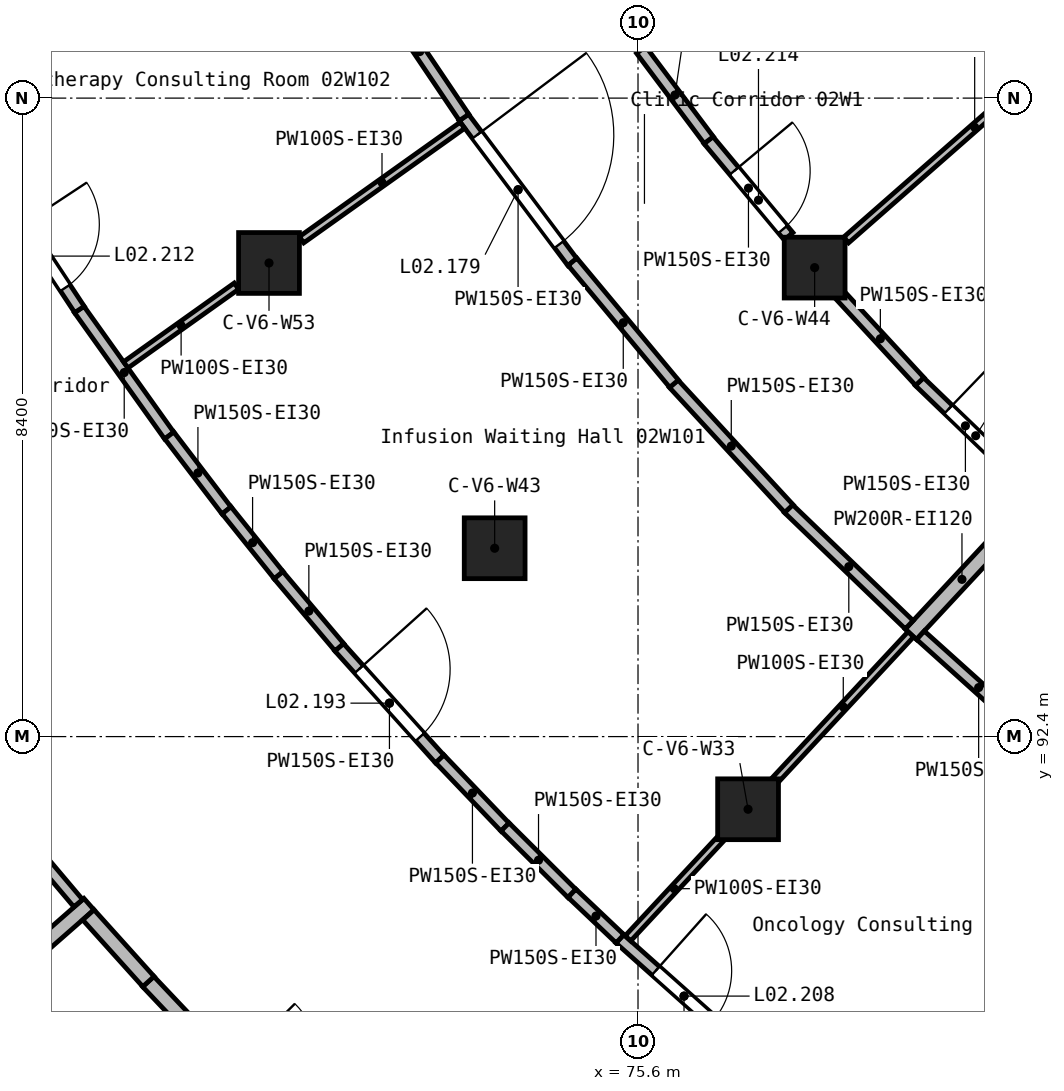
"""IFC4 building model, lengths in metres.
Left out: names, types, materials, properties, quantities, classifications, styles, units other than length and angle.
Written with IfcOpenShell. Run it as: python <this file> out.ifc"""

import sys

from ifc_helpers import new_model, si_unit, direction, frame, frame_2d, origin, origin_2d, place, context, subcontext, project, spatial, rectangle, extrude, element, fill, save


model = new_model("IFC4")
c1 = context("Model", 3, precision=1e-05, world=origin(), true_north=direction((0.0, 1.0)))
c2 = subcontext(c1, "Body", "Model", "MODEL_VIEW")
j1 = project(units=[si_unit("LENGTHUNIT", "METRE"), si_unit("PLANEANGLEUNIT", "RADIAN")], contexts=[c1])
p1 = place(None, origin())
s1 = spatial("IfcSite", under=j1, at=p1, CompositionType="ELEMENT")
p2 = place(p1, origin())
s2 = spatial("IfcBuilding", under=s1, at=p2, CompositionType="ELEMENT")
p3 = place(p2, frame((0.0, 0.0, 12.6)))
s3 = spatial("IfcBuildingStorey", under=s2, at=p3, CompositionType="ELEMENT", Elevation=12.6)
for number, where, z_axis, x_axis in (
    (1, (70.745, 98.631, 0.0), (0.0, 0.0, 1.0), (1.0, 0.0, 0.0)),
    (2, (73.714, 94.878, 0.0), (0.0, 0.0, 1.0), (1.0, 0.0, 0.0)),
    (3, (77.048, 91.444, 0.0), (0.0, 0.0, 1.0), (1.0, 0.0, 0.0)),
    (4, (77.924, 98.57, 0.0), (0.0, 0.0, 1.0), (1.0, 0.0, 0.0)),
):
    element("IfcColumn", number, at=place(p3, frame(where, z_axis=z_axis, x_axis=x_axis)), inside=s3, PredefinedType="COLUMN", context=c2, shape_type="SweptSolid", body=[
        extrude(rectangle(XDim=0.8, YDim=0.8, at=origin_2d()), origin(), (0.0, 0.0, 1.0), 4.2),
    ])
p4 = place(p3, frame((66.869, 88.874, 0.0), z_axis=(0.0, 0.0, 1.0), x_axis=(0.751874567132, 0.659306177205, 0.0)))
e5 = element("IfcWall", 5, at=p4, inside=s3, PredefinedType="SOLIDWALL", context=c2, shape_type="SweptSolid", body=[
    extrude(rectangle(XDim=2.004, YDim=0.2, at=frame_2d((1.002, 0.0))), origin(), (0.0, 0.0, 1.0), 3.85),
])
p5 = place(p3, frame((79.19, 93.746, 0.0), z_axis=(0.0, 0.0, 1.0), x_axis=(0.681171780306, 0.732123627344, 0.0)))
e6 = element("IfcWall", 6, at=p5, inside=s3, PredefinedType="SOLIDWALL", context=c2, shape_type="SweptSolid", body=[
    extrude(rectangle(XDim=1.974, YDim=0.2, at=frame_2d((0.987, 0.0))), origin(), (0.0, 0.0, 1.0), 3.85),
])
p6 = place(p3, frame((69.155, 89.177, 0.0), z_axis=(0.0, 0.0, 1.0), x_axis=(0.687313254989, -0.726361128858, 0.0)))
e7 = element("IfcWall", 7, at=p6, inside=s3, PredefinedType="SOLIDWALL", context=c2, shape_type="SweptSolid", body=[
    extrude(rectangle(XDim=1.382, YDim=0.2, at=frame_2d((0.691, 0.0))), origin(), (0.0, 0.0, 1.0), 3.85),
])
p7 = place(p3, frame((68.369, 90.055, 0.0), z_axis=(0.0, 0.0, 1.0), x_axis=(0.669113274241, -0.74316043102, 0.0)))
e8 = element("IfcWall", 8, at=p7, inside=s3, PredefinedType="SOLIDWALL", context=c2, shape_type="SweptSolid", body=[
    extrude(rectangle(XDim=1.18, YDim=0.2, at=frame_2d((0.59, 0.0))), origin(), (0.0, 0.0, 1.0), 3.85),
])
p8 = place(p3, frame((73.307, 100.547, 0.0), z_axis=(0.0, 0.0, 1.0), x_axis=(0.600377090661, -0.799717043091, 0.0)))
e9 = element("IfcWall", 9, at=p8, inside=s3, PredefinedType="PARTITIONING", context=c2, shape_type="SweptSolid", body=[
    extrude(rectangle(XDim=2.382, YDim=0.15, at=frame_2d((1.191, 0.0))), origin(), (0.0, 0.0, 1.0), 3.85),
])
p9 = place(p8, frame((0.291, 0.0, 0.0)))
e10 = element("IfcOpeningElement", 10, at=p9, cuts=e9, PredefinedType="OPENING", context=c2, shape_type="SweptSolid", body=[
    extrude(rectangle(XDim=1.8, YDim=2.1, at=frame_2d((0.9, 1.05))), frame((0.0, 0.085, 0.0), z_axis=(0.0, -1.0, 0.0), x_axis=(1.0, 0.0, 0.0)), (0.0, 0.0, 1.0), 0.17),
])
p10 = place(p3, frame((77.579, 95.4, 0.0), z_axis=(0.0, 0.0, 1.0), x_axis=(0.720594722174, -0.693356507415, 0.0)))
e11 = element("IfcWall", 11, at=p10, inside=s3, PredefinedType="PARTITIONING", context=c2, shape_type="SweptSolid", body=[
    extrude(rectangle(XDim=2.205, YDim=0.15, at=frame_2d((1.103, 0.0))), origin(), (0.0, 0.0, 1.0), 3.85),
])
p11 = place(p3, frame((76.069, 97.043, 0.0), z_axis=(0.0, 0.0, 1.0), x_axis=(0.678030610295, -0.735033666918, 0.0)))
e12 = element("IfcWall", 12, at=p11, inside=s3, PredefinedType="PARTITIONING", context=c2, shape_type="SweptSolid", body=[
    extrude(rectangle(XDim=2.236, YDim=0.15, at=frame_2d((1.118, 0.0))), origin(), (0.0, 0.0, 1.0), 3.85),
])
p12 = place(p3, frame((79.316, 93.733, 0.0), z_axis=(0.0, 0.0, 1.0), x_axis=(0.74346507851, -0.668774758073, 0.0)))
e13 = element("IfcWall", 13, at=p12, inside=s3, PredefinedType="PARTITIONING", context=c2, shape_type="SweptSolid", body=[
    extrude(rectangle(XDim=2.059, YDim=0.15, at=frame_2d((1.03, 0.0))), origin(), (0.0, 0.0, 1.0), 3.85),
])
p13 = place(p3, frame((72.145, 102.278, 0.0), z_axis=(0.0, 0.0, 1.0), x_axis=(0.558900636953, -0.829234633873, 0.0)))
e14 = element("IfcWall", 14, at=p13, inside=s3, PredefinedType="PARTITIONING", context=c2, shape_type="SweptSolid", body=[
    extrude(rectangle(XDim=2.089, YDim=0.15, at=frame_2d((1.044, 0.0))), origin(), (0.0, 0.0, 1.0), 3.85),
])
p14 = place(p3, frame((74.738, 98.647, 0.0), z_axis=(0.0, 0.0, 1.0), x_axis=(0.640000381719, -0.768374590548, 0.0)))
e15 = element("IfcWall", 15, at=p14, inside=s3, PredefinedType="PARTITIONING", context=c2, shape_type="SweptSolid", body=[
    extrude(rectangle(XDim=2.088, YDim=0.15, at=frame_2d((1.044, 0.0))), origin(), (0.0, 0.0, 1.0), 3.85),
])
p15 = place(p3, frame((75.36, 89.74, 0.0), z_axis=(0.0, 0.0, 1.0), x_axis=(0.746361982095, -0.665540225443, 0.0)))
e16 = element("IfcWall", 16, at=p15, inside=s3, PredefinedType="PARTITIONING", context=c2, shape_type="SweptSolid", body=[
    extrude(rectangle(XDim=2.266, YDim=0.15, at=frame_2d((1.133, 0.0))), origin(), (0.0, 0.0, 1.0), 3.85),
])
p16 = place(p15, frame((0.633, 0.0, 0.0)))
e17 = element("IfcOpeningElement", 17, at=p16, cuts=e16, PredefinedType="OPENING", context=c2, shape_type="SweptSolid", body=[
    extrude(rectangle(XDim=1.0, YDim=2.1, at=frame_2d((0.5, 1.05))), frame((0.0, 0.085, 0.0), z_axis=(0.0, -1.0, 0.0), x_axis=(1.0, 0.0, 0.0)), (0.0, 0.0, 1.0), 0.17),
])
p17 = place(p3, frame((79.301, 97.072, 0.0), z_axis=(0.0, 0.0, 1.0), x_axis=(0.720465115712, -0.69349118022, 0.0)))
e18 = element("IfcWall", 18, at=p17, inside=s3, PredefinedType="PARTITIONING", context=c2, shape_type="SweptSolid", body=[
    extrude(rectangle(XDim=1.684, YDim=0.15, at=frame_2d((0.842, 0.0))), origin(), (0.0, 0.0, 1.0), 3.85),
])
p18 = place(p17, frame((0.53, 0.0, 0.0)))
e19 = element("IfcOpeningElement", 19, at=p18, cuts=e18, PredefinedType="OPENING", context=c2, shape_type="SweptSolid", body=[
    extrude(rectangle(XDim=1.0, YDim=2.1, at=frame_2d((0.5, 1.05))), frame((0.0, 0.085, 0.0), z_axis=(0.0, -1.0, 0.0), x_axis=(1.0, 0.0, 0.0)), (0.0, 0.0, 1.0), 0.17),
])
p19 = place(p3, frame((78.27, 98.195, 0.0), z_axis=(0.0, 0.0, 1.0), x_axis=(0.678273469528, -0.73480956753, 0.0)))
e20 = element("IfcWall", 20, at=p19, inside=s3, PredefinedType="PARTITIONING", context=c2, shape_type="SweptSolid", body=[
    extrude(rectangle(XDim=1.529, YDim=0.15, at=frame_2d((0.764, 0.0))), origin(), (0.0, 0.0, 1.0), 3.85),
])
p20 = place(p3, frame((76.526, 100.249, 0.0), z_axis=(0.0, 0.0, 1.0), x_axis=(0.640038659854, -0.768342706019, 0.0)))
e21 = element("IfcWall", 21, at=p20, inside=s3, PredefinedType="PARTITIONING", context=c2, shape_type="SweptSolid", body=[
    extrude(rectangle(XDim=1.648, YDim=0.15, at=frame_2d((0.824, 0.0))), origin(), (0.0, 0.0, 1.0), 3.85),
])
p21 = place(p20, frame((0.53, 0.0, 0.0)))
e22 = element("IfcOpeningElement", 22, at=p21, cuts=e21, PredefinedType="OPENING", context=c2, shape_type="SweptSolid", body=[
    extrude(rectangle(XDim=1.0, YDim=2.1, at=frame_2d((0.5, 1.05))), frame((0.0, 0.085, 0.0), z_axis=(0.0, -1.0, 0.0), x_axis=(1.0, 0.0, 0.0)), (0.0, 0.0, 1.0), 0.17),
])
p22 = place(p3, frame((75.641, 101.434, 0.0), z_axis=(0.0, 0.0, 1.0), x_axis=(0.60023710435, -0.799822116825, 0.0)))
e23 = element("IfcWall", 23, at=p22, inside=s3, PredefinedType="PARTITIONING", context=c2, shape_type="SweptSolid", body=[
    extrude(rectangle(XDim=1.483, YDim=0.15, at=frame_2d((0.741, 0.0))), origin(), (0.0, 0.0, 1.0), 3.85),
])
p23 = place(p3, frame((67.052, 91.609, 0.0), z_axis=(0.0, 0.0, 1.0), x_axis=(0.645369063346, -0.763870913228, 0.0)))
e24 = element("IfcWall", 24, at=p23, inside=s3, PredefinedType="PARTITIONING", context=c2, shape_type="SweptSolid", body=[
    extrude(rectangle(XDim=1.833, YDim=0.15, at=frame_2d((0.917, 0.0))), origin(), (0.0, 0.0, 1.0), 3.85),
])
p24 = place(p3, frame((68.247, 98.02, 0.0), z_axis=(0.0, 0.0, 1.0), x_axis=(0.580842026392, -0.81401630228, 0.0)))
e25 = element("IfcWall", 25, at=p24, inside=s3, PredefinedType="PARTITIONING", context=c2, shape_type="SweptSolid", body=[
    extrude(rectangle(XDim=2.041, YDim=0.15, at=frame_2d((1.021, 0.0))), origin(), (0.0, 0.0, 1.0), 3.85),
])
p25 = place(p3, frame((71.667, 93.577, 0.0), z_axis=(0.0, 0.0, 1.0), x_axis=(0.668733315137, -0.743502355898, 0.0)))
e26 = element("IfcWall", 26, at=p25, inside=s3, PredefinedType="PARTITIONING", context=c2, shape_type="SweptSolid", body=[
    extrude(rectangle(XDim=1.982, YDim=0.15, at=frame_2d((0.991, 0.0))), origin(), (0.0, 0.0, 1.0), 3.85),
])
p26 = place(p25, frame((0.391, 0.0, 0.0)))
e27 = element("IfcOpeningElement", 27, at=p26, cuts=e26, PredefinedType="OPENING", context=c2, shape_type="SweptSolid", body=[
    extrude(rectangle(XDim=1.2, YDim=2.1, at=frame_2d((0.6, 1.05))), frame((0.0, 0.085, 0.0), z_axis=(0.0, -1.0, 0.0), x_axis=(1.0, 0.0, 0.0)), (0.0, 0.0, 1.0), 0.17),
])
p27 = place(p3, frame((67.244, 99.547, 0.0), z_axis=(0.0, 0.0, 1.0), x_axis=(0.550660027371, -0.834729617454, 0.0)))
e28 = element("IfcWall", 28, at=p27, inside=s3, PredefinedType="PARTITIONING", context=c2, shape_type="SweptSolid", body=[
    extrude(rectangle(XDim=1.83, YDim=0.15, at=frame_2d((0.915, 0.0))), origin(), (0.0, 0.0, 1.0), 3.85),
])
p28 = place(p27, frame((0.489, 0.0, 0.0)))
e29 = element("IfcOpeningElement", 29, at=p28, cuts=e28, PredefinedType="OPENING", context=c2, shape_type="SweptSolid", body=[
    extrude(rectangle(XDim=1.0, YDim=2.1, at=frame_2d((0.5, 1.05))), frame((0.0, 0.085, 0.0), z_axis=(0.0, -1.0, 0.0), x_axis=(1.0, 0.0, 0.0)), (0.0, 0.0, 1.0), 0.17),
])
p29 = place(p3, frame((69.433, 96.362, 0.0), z_axis=(0.0, 0.0, 1.0), x_axis=(0.606457599152, -0.795115828311, 0.0)))
e30 = element("IfcWall", 30, at=p29, inside=s3, PredefinedType="PARTITIONING", context=c2, shape_type="SweptSolid", body=[
    extrude(rectangle(XDim=1.242, YDim=0.15, at=frame_2d((0.621, 0.0))), origin(), (0.0, 0.0, 1.0), 3.85),
])
p30 = place(p3, frame((72.992, 92.106, 0.0), z_axis=(0.0, 0.0, 1.0), x_axis=(0.691209259047, -0.72265466179, 0.0)))
e31 = element("IfcWall", 31, at=p30, inside=s3, PredefinedType="PARTITIONING", context=c2, shape_type="SweptSolid", body=[
    extrude(rectangle(XDim=1.242, YDim=0.15, at=frame_2d((0.621, 0.0))), origin(), (0.0, 0.0, 1.0), 3.85),
])
p31 = place(p3, frame((70.869, 94.525, 0.0), z_axis=(0.0, 0.0, 1.0), x_axis=(0.645236922374, -0.763982535144, 0.0)))
e32 = element("IfcWall", 32, at=p31, inside=s3, PredefinedType="PARTITIONING", context=c2, shape_type="SweptSolid", body=[
    extrude(rectangle(XDim=1.242, YDim=0.15, at=frame_2d((0.621, 0.0))), origin(), (0.0, 0.0, 1.0), 3.85),
])
p32 = place(p3, frame((73.851, 91.211, 0.0), z_axis=(0.0, 0.0, 1.0), x_axis=(0.709168733207, -0.70503879882, 0.0)))
e33 = element("IfcWall", 33, at=p32, inside=s3, PredefinedType="PARTITIONING", context=c2, shape_type="SweptSolid", body=[
    extrude(rectangle(XDim=1.241, YDim=0.15, at=frame_2d((0.621, 0.0))), origin(), (0.0, 0.0, 1.0), 3.85),
])
p33 = place(p3, frame((70.187, 95.377, 0.0), z_axis=(0.0, 0.0, 1.0), x_axis=(0.626301399266, -0.779581013928, 0.0)))
e34 = element("IfcWall", 34, at=p33, inside=s3, PredefinedType="PARTITIONING", context=c2, shape_type="SweptSolid", body=[
    extrude(rectangle(XDim=1.093, YDim=0.15, at=frame_2d((0.546, 0.0))), origin(), (0.0, 0.0, 1.0), 3.85),
])
p34 = place(p3, frame((74.731, 90.339, 0.0), z_axis=(0.0, 0.0, 1.0), x_axis=(0.725923200466, -0.687775767984, 0.0)))
e35 = element("IfcWall", 35, at=p34, inside=s3, PredefinedType="PARTITIONING", context=c2, shape_type="SweptSolid", body=[
    extrude(rectangle(XDim=0.87, YDim=0.15, at=frame_2d((0.435, 0.0))), origin(), (0.0, 0.0, 1.0), 3.85),
])
p35 = place(p3, frame((78.338, 98.933, 0.0), z_axis=(0.0, 0.0, 1.0), x_axis=(0.751823288541, 0.659364650863, 0.0)))
e36 = element("IfcWall", 36, at=p35, inside=s3, PredefinedType="PARTITIONING", context=c2, shape_type="SweptSolid", body=[
    extrude(rectangle(XDim=4.5, YDim=0.1, at=frame_2d((2.25, 0.0))), origin(), (0.0, 0.0, 1.0), 3.85),
])
p36 = place(p3, frame((75.468, 89.746, 0.0), z_axis=(0.0, 0.0, 1.0), x_axis=(0.681143154038, 0.732150260334, 0.0)))
e37 = element("IfcWall", 37, at=p36, inside=s3, PredefinedType="PARTITIONING", context=c2, shape_type="SweptSolid", body=[
    extrude(rectangle(XDim=1.785, YDim=0.1, at=frame_2d((0.893, 0.0))), origin(), (0.0, 0.0, 1.0), 3.85),
])
p37 = place(p3, frame((77.412, 91.835, 0.0), z_axis=(0.0, 0.0, 1.0), x_axis=(0.681147107729, 0.732146582067, 0.0)))
e38 = element("IfcWall", 38, at=p37, inside=s3, PredefinedType="PARTITIONING", context=c2, shape_type="SweptSolid", body=[
    extrude(rectangle(XDim=2.609, YDim=0.1, at=frame_2d((1.304, 0.0))), origin(), (0.0, 0.0, 1.0), 3.85),
])
p38 = place(p3, frame((68.861, 97.29, 0.0), z_axis=(0.0, 0.0, 1.0), x_axis=(0.814701484378, 0.5798805837, 0.0)))
e39 = element("IfcWall", 39, at=p38, inside=s3, PredefinedType="PARTITIONING", context=c2, shape_type="SweptSolid", body=[
    extrude(rectangle(XDim=1.787, YDim=0.1, at=frame_2d((0.894, 0.0))), origin(), (0.0, 0.0, 1.0), 3.85),
])
p39 = place(p3, frame((71.173, 98.936, 0.0), z_axis=(0.0, 0.0, 1.0), x_axis=(0.814672160951, 0.579921779355, 0.0)))
e40 = element("IfcWall", 40, at=p39, inside=s3, PredefinedType="PARTITIONING", context=c2, shape_type="SweptSolid", body=[
    extrude(rectangle(XDim=2.598, YDim=0.1, at=frame_2d((1.299, 0.0))), origin(), (0.0, 0.0, 1.0), 3.85),
])
p40 = place(p9, origin())
e41 = element("IfcDoor", 41, at=p40, inside=s3, OperationType="DOUBLE_DOOR_SINGLE_SWING", PredefinedType="DOOR", context=c2, shape_type="SweptSolid", body=[
    extrude(rectangle(XDim=1.8, YDim=2.1, at=frame_2d((0.9, 1.05))), frame((0.0, 0.025, 0.0), z_axis=(0.0, -1.0, 0.0), x_axis=(1.0, 0.0, 0.0)), (0.0, 0.0, 1.0), 0.05),
])
fill(e10, e41)
p41 = place(p26, frame((1.2, 0.0, 0.0), z_axis=(0.0, 0.0, 1.0), x_axis=(-1.0, 0.0, 0.0)))
e42 = element("IfcDoor", 42, at=p41, inside=s3, OperationType="SINGLE_SWING_RIGHT", PredefinedType="DOOR", context=c2, shape_type="SweptSolid", body=[
    extrude(rectangle(XDim=1.2, YDim=2.1, at=frame_2d((0.6, 1.05))), frame((0.0, 0.025, 0.0), z_axis=(0.0, -1.0, 0.0), x_axis=(1.0, 0.0, 0.0)), (0.0, 0.0, 1.0), 0.05),
])
fill(e27, e42)
p42 = place(p16, origin())
e43 = element("IfcDoor", 43, at=p42, inside=s3, OperationType="SINGLE_SWING_LEFT", PredefinedType="DOOR", context=c2, shape_type="SweptSolid", body=[
    extrude(rectangle(XDim=1.0, YDim=2.1, at=frame_2d((0.5, 1.05))), frame((0.0, 0.025, 0.0), z_axis=(0.0, -1.0, 0.0), x_axis=(1.0, 0.0, 0.0)), (0.0, 0.0, 1.0), 0.05),
])
fill(e17, e43)
p43 = place(p28, origin())
e44 = element("IfcDoor", 44, at=p43, inside=s3, OperationType="SINGLE_SWING_RIGHT", PredefinedType="DOOR", context=c2, shape_type="SweptSolid", body=[
    extrude(rectangle(XDim=1.0, YDim=2.1, at=frame_2d((0.5, 1.05))), frame((0.0, 0.025, 0.0), z_axis=(0.0, -1.0, 0.0), x_axis=(1.0, 0.0, 0.0)), (0.0, 0.0, 1.0), 0.05),
])
fill(e29, e44)
p44 = place(p18, origin())
e45 = element("IfcDoor", 45, at=p44, inside=s3, OperationType="SINGLE_SWING_RIGHT", PredefinedType="DOOR", context=c2, shape_type="SweptSolid", body=[
    extrude(rectangle(XDim=1.0, YDim=2.1, at=frame_2d((0.5, 1.05))), frame((0.0, 0.025, 0.0), z_axis=(0.0, -1.0, 0.0), x_axis=(1.0, 0.0, 0.0)), (0.0, 0.0, 1.0), 0.05),
])
fill(e19, e45)
p45 = place(p21, origin())
e46 = element("IfcDoor", 46, at=p45, inside=s3, OperationType="SINGLE_SWING_RIGHT", PredefinedType="DOOR", context=c2, shape_type="SweptSolid", body=[
    extrude(rectangle(XDim=1.0, YDim=2.1, at=frame_2d((0.5, 1.05))), frame((0.0, 0.025, 0.0), z_axis=(0.0, -1.0, 0.0), x_axis=(1.0, 0.0, 0.0)), (0.0, 0.0, 1.0), 0.05),
])
fill(e22, e46)
save(model, sys.argv[1])
